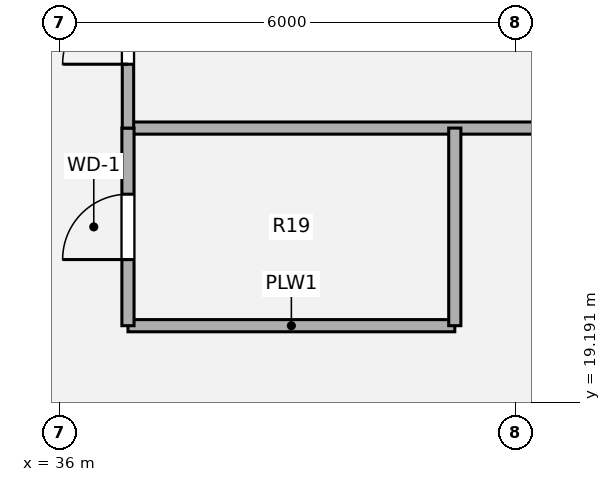
"""IFC4 building model, lengths in metres.
Left out: names, types, materials, properties, quantities, classifications, styles, units other than length and angle.
Written with IfcOpenShell. Run it as: python <this file> out.ifc"""

import sys

from ifc_helpers import new_model, si_unit, direction, frame, frame_2d, origin, origin_2d, place, context, subcontext, project, spatial, rectangle, extrude, source, transform, mapped, element, fill, save


model = new_model("IFC4")
c1 = context("Model", 3, precision=1e-05, world=origin(), true_north=direction((0.0, 1.0)))
c2 = subcontext(c1, "Body", "Model", "MODEL_VIEW")
j1 = project(units=[si_unit("LENGTHUNIT", "METRE"), si_unit("PLANEANGLEUNIT", "RADIAN")], contexts=[c1])
p1 = place(None, origin())
s1 = spatial("IfcSite", under=j1, at=p1, CompositionType="ELEMENT")
p2 = place(p1, origin())
s2 = spatial("IfcBuilding", under=s1, at=p2, CompositionType="ELEMENT")
p3 = place(p2, frame((0.0, 0.0, 142.74)))
s3 = spatial("IfcBuildingStorey", under=s2, at=p3, CompositionType="ELEMENT", Elevation=142.74)
p4 = place(p3, frame((36.9, 20.2, 0.0), z_axis=(0.0, 0.0, 1.0), x_axis=(1.0, 0.0, 0.0)))
e1 = element("IfcWall", 1, at=p4, inside=s3, PredefinedType="PLUMBINGWALL", context=c2, shape_type="SweptSolid", body=[
    extrude(rectangle(XDim=4.3, YDim=0.16, at=frame_2d((2.15, 0.0))), origin(), (0.0, 0.0, 1.0), 3.342),
])
p5 = place(p3, frame((36.9, 22.8, 0.0), z_axis=(0.0, 0.0, 1.0), x_axis=(1.0, 0.0, 0.0)))
e2 = element("IfcWall", 2, at=p5, inside=s3, PredefinedType="PLUMBINGWALL", context=c2, shape_type="SweptSolid", body=[
    extrude(rectangle(XDim=6.82, YDim=0.16, at=frame_2d((3.41, 0.0))), origin(), (0.0, 0.0, 1.0), 3.342),
])
p6 = place(p3, frame((36.9, 20.2, 0.0), z_axis=(0.0, 0.0, 1.0), x_axis=(0.0, 1.0, 0.0)))
e3 = element("IfcWall", 3, at=p6, inside=s3, PredefinedType="PLUMBINGWALL", context=c2, shape_type="SweptSolid", body=[
    extrude(rectangle(XDim=2.6, YDim=0.16, at=frame_2d((1.3, 0.0))), origin(), (0.0, 0.0, 1.0), 3.342),
])
p7 = place(p6, frame((0.87, 0.0, 0.0)))
e4 = element("IfcOpeningElement", 4, at=p7, cuts=e3, PredefinedType="OPENING", context=c2, shape_type="SweptSolid", body=[
    extrude(rectangle(XDim=0.86, YDim=2.1, at=origin_2d()), frame((0.43, 0.09, 1.05), z_axis=(0.0, -1.0, 0.0), x_axis=(1.0, 0.0, 0.0)), (0.0, 0.0, 1.0), 0.18),
])
p8 = place(p3, frame((36.9, 22.8, 0.0), z_axis=(0.0, 0.0, 1.0), x_axis=(0.0, 1.0, 0.0)))
e5 = element("IfcWall", 5, at=p8, inside=s3, PredefinedType="PARTITIONING", context=c2, shape_type="SweptSolid", body=[
    extrude(rectangle(XDim=2.6, YDim=0.15, at=frame_2d((1.3, 0.0))), origin(), (0.0, 0.0, 1.0), 3.342),
])
p9 = place(p8, frame((0.84, 0.0, 0.0)))
e6 = element("IfcOpeningElement", 6, at=p9, cuts=e5, PredefinedType="OPENING", context=c2, shape_type="SweptSolid", body=[
    extrude(rectangle(XDim=0.86, YDim=2.1, at=origin_2d()), frame((0.43, 0.085, 1.05), z_axis=(0.0, -1.0, 0.0), x_axis=(1.0, 0.0, 0.0)), (0.0, 0.0, 1.0), 0.17),
])
p10 = place(p3, frame((41.2, 20.2, 0.0), z_axis=(0.0, 0.0, 1.0), x_axis=(0.0, 1.0, 0.0)))
e7 = element("IfcWall", 7, at=p10, inside=s3, PredefinedType="PLUMBINGWALL", context=c2, shape_type="SweptSolid", body=[
    extrude(rectangle(XDim=2.6, YDim=0.16, at=frame_2d((1.3, 0.0))), origin(), (0.0, 0.0, 1.0), 1.857),
])
m1 = source(origin(), c2, "Body", "SweptSolid", [
    extrude(rectangle(XDim=0.86, YDim=2.1, at=origin_2d()), frame((0.43, 0.025, 1.05), z_axis=(0.0, -1.0, 0.0), x_axis=(1.0, 0.0, 0.0)), (0.0, 0.0, 1.0), 0.05),
])
p11 = place(p7, origin())
e8 = element("IfcDoor", 8, at=p11, inside=s3, OperationType="SINGLE_SWING_LEFT", PredefinedType="DOOR", context=c2, shape_type="MappedRepresentation", body=[
    mapped(m1, transform((0.0, 0.0, 0.0), x_axis=(1.0, 0.0, 0.0), y_axis=(0.0, 1.0, 0.0), z_axis=(0.0, 0.0, 1.0), scale=1.0)),
])
fill(e4, e8)
m2 = source(origin(), c2, "Body", "SweptSolid", [
    extrude(rectangle(XDim=0.86, YDim=2.1, at=origin_2d()), frame((0.43, 0.025, 1.05), z_axis=(0.0, -1.0, 0.0), x_axis=(1.0, 0.0, 0.0)), (0.0, 0.0, 1.0), 0.05),
])
p12 = place(p9, origin())
e9 = element("IfcDoor", 9, at=p12, inside=s3, OperationType="SINGLE_SWING_LEFT", PredefinedType="DOOR", context=c2, shape_type="MappedRepresentation", body=[
    mapped(m2, transform((0.0, 0.0, 0.0), x_axis=(1.0, 0.0, 0.0), y_axis=(0.0, 1.0, 0.0), z_axis=(0.0, 0.0, 1.0), scale=1.0)),
])
fill(e6, e9)
save(model, sys.argv[1])
